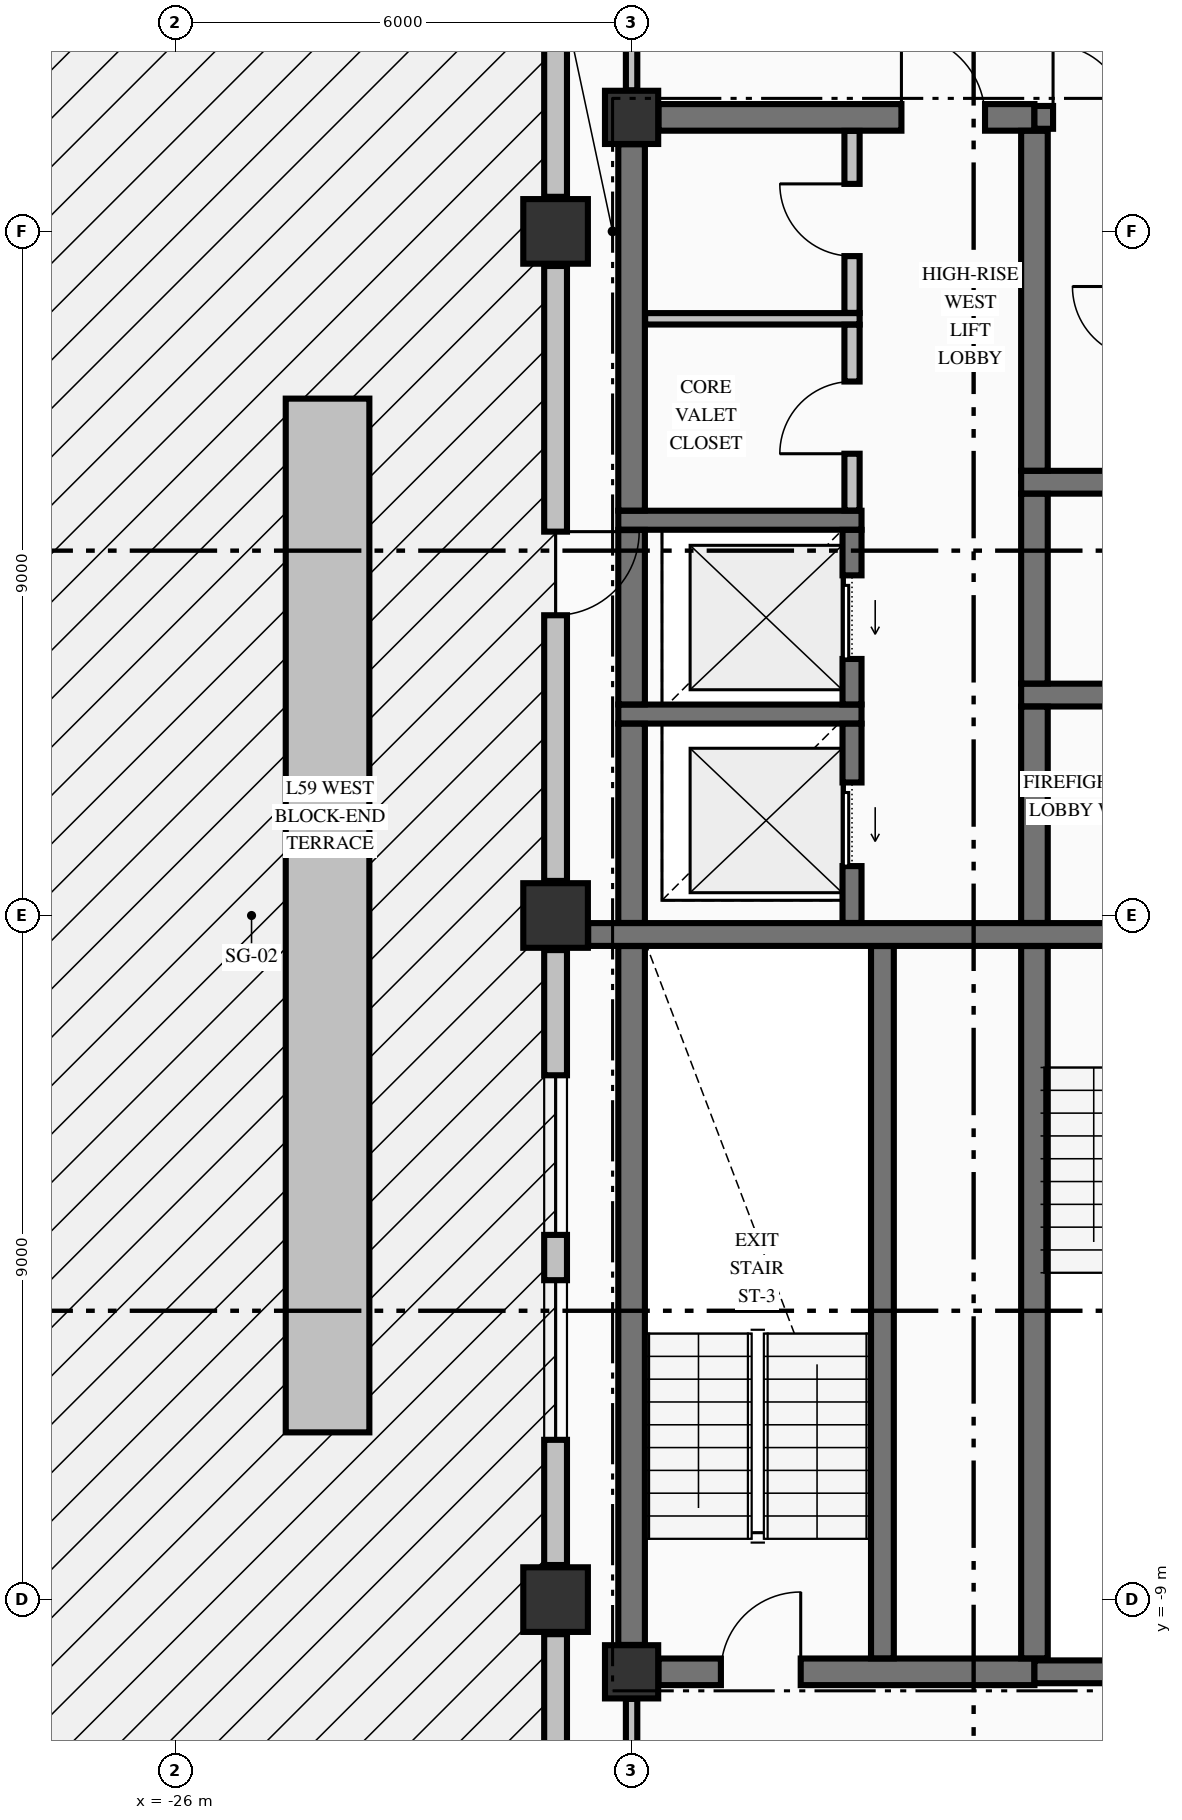
"""IFC4 building model, lengths in metres.
Left out: names, types, materials, properties, quantities, classifications, styles, units other than length and angle.
Written with IfcOpenShell. Run it as: python <this file> out.ifc"""

import sys

from ifc_helpers import new_model, si_unit, direction, frame, frame_2d, origin, origin_2d, place, context, subcontext, project, spatial, rectangle, extrude, element, fill, save


model = new_model("IFC4")
c1 = context("Model", 3, precision=1e-05, world=origin(), true_north=direction((0.0, 1.0)))
c2 = subcontext(c1, "Body", "Model", "MODEL_VIEW")
j1 = project(units=[si_unit("LENGTHUNIT", "METRE"), si_unit("PLANEANGLEUNIT", "RADIAN")], contexts=[c1])
p1 = place(None, origin())
s1 = spatial("IfcSite", under=j1, at=p1, CompositionType="ELEMENT")
p2 = place(p1, origin())
s2 = spatial("IfcBuilding", under=s1, at=p2, CompositionType="ELEMENT")
p3 = place(p2, frame((0.0, 0.0, 226.82)))
s3 = spatial("IfcBuildingStorey", under=s2, at=p3, CompositionType="ELEMENT", Elevation=226.82)
for number, where, z_axis, x_axis in (
    (1, (-21.0, -9.0, -0.425), (0.0, 0.0, 1.0), (1.0, 0.0, 0.0)),
    (2, (-21.0, 0.0, -0.425), (0.0, 0.0, 1.0), (1.0, 0.0, 0.0)),
    (3, (-21.0, 9.0, -0.425), (0.0, 0.0, 1.0), (1.0, 0.0, 0.0)),
):
    element("IfcColumn", number, at=place(p3, frame(where, z_axis=z_axis, x_axis=x_axis)), inside=s3, PredefinedType="COLUMN", context=c2, shape_type="SweptSolid", body=[
        extrude(rectangle(XDim=0.85, YDim=0.85, at=origin_2d()), origin(), (0.0, 0.0, 1.0), 3.405),
    ])
for number, where, z_axis, x_axis in (
    (4, (-20.0, -9.95, -0.425), (0.0, 0.0, 1.0), (1.0, 0.0, 0.0)),
    (5, (-20.0, 10.5, -0.425), (0.0, 0.0, 1.0), (1.0, 0.0, 0.0)),
):
    element("IfcColumn", number, at=place(p3, frame(where, z_axis=z_axis, x_axis=x_axis)), inside=s3, PredefinedType="COLUMN", context=c2, shape_type="SweptSolid", body=[
        extrude(rectangle(XDim=0.7, YDim=0.7, at=origin_2d()), origin(), (0.0, 0.0, 1.0), 3.405),
    ])
p4 = place(p3, frame((-21.0, -9.455, 0.0), z_axis=(0.0, 0.0, 1.0), x_axis=(0.0, -1.0, 0.0)))
e6 = element("IfcWall", 6, at=p4, inside=s3, PredefinedType="STANDARD", context=c2, shape_type="SweptSolid", body=[
    extrude(rectangle(XDim=8.09, YDim=0.3, at=frame_2d((4.045, 0.0))), origin(), (0.0, 0.0, 1.0), 2.372),
])
p5 = place(p3, frame((-21.0, -0.455, 0.0), z_axis=(0.0, 0.0, 1.0), x_axis=(0.0, -1.0, 0.0)))
e7 = element("IfcWall", 7, at=p5, inside=s3, PredefinedType="STANDARD", context=c2, shape_type="SweptSolid", body=[
    extrude(rectangle(XDim=8.09, YDim=0.3, at=frame_2d((4.045, 0.0))), origin(), (0.0, 0.0, 1.0), 2.372),
])
p6 = place(p5, frame((1.647, 0.0, 0.7)))
e8 = element("IfcOpeningElement", 8, at=p6, cuts=e7, PredefinedType="OPENING", context=c2, shape_type="SweptSolid", body=[
    extrude(rectangle(XDim=2.1, YDim=1.5, at=frame_2d((1.05, 0.75))), frame((0.0, 0.16, 0.0), z_axis=(0.0, -1.0, 0.0), x_axis=(1.0, 0.0, 0.0)), (0.0, 0.0, 1.0), 0.32),
])
p7 = place(p5, frame((4.343, 0.0, 0.7)))
e9 = element("IfcOpeningElement", 9, at=p7, cuts=e7, PredefinedType="OPENING", context=c2, shape_type="SweptSolid", body=[
    extrude(rectangle(XDim=2.1, YDim=1.5, at=frame_2d((1.05, 0.75))), frame((0.0, 0.16, 0.0), z_axis=(0.0, -1.0, 0.0), x_axis=(1.0, 0.0, 0.0)), (0.0, 0.0, 1.0), 0.32),
])
p8 = place(p3, frame((-21.0, 8.545, 0.0), z_axis=(0.0, 0.0, 1.0), x_axis=(0.0, -1.0, 0.0)))
e10 = element("IfcWall", 10, at=p8, inside=s3, PredefinedType="STANDARD", context=c2, shape_type="SweptSolid", body=[
    extrude(rectangle(XDim=8.09, YDim=0.3, at=frame_2d((4.045, 0.0))), origin(), (0.0, 0.0, 1.0), 2.372),
])
p9 = place(p8, frame((3.495, 0.0, 0.0)))
e11 = element("IfcOpeningElement", 11, at=p9, cuts=e10, PredefinedType="OPENING", context=c2, shape_type="SweptSolid", body=[
    extrude(rectangle(XDim=1.1, YDim=2.15, at=frame_2d((0.55, 1.075))), frame((0.0, 0.16, 0.0), z_axis=(0.0, -1.0, 0.0), x_axis=(1.0, 0.0, 0.0)), (0.0, 0.0, 1.0), 0.32),
])
p10 = place(p3, frame((-21.0, 17.545, 0.0), z_axis=(0.0, 0.0, 1.0), x_axis=(0.0, -1.0, 0.0)))
e12 = element("IfcWall", 12, at=p10, inside=s3, PredefinedType="STANDARD", context=c2, shape_type="SweptSolid", body=[
    extrude(rectangle(XDim=8.09, YDim=0.3, at=frame_2d((4.045, 0.0))), origin(), (0.0, 0.0, 1.0), 2.372),
])
p11 = place(p3, frame((-19.646, -9.95, 0.0), z_axis=(0.0, 0.0, 1.0), x_axis=(1.0, 0.0, 0.0)))
e13 = element("IfcWall", 13, at=p11, inside=s3, PredefinedType="SHEAR", context=c2, shape_type="SweptSolid", body=[
    extrude(rectangle(XDim=4.946, YDim=0.35, at=frame_2d((2.473, 0.0))), origin(), (0.0, 0.0, 1.0), 2.98),
])
p12 = place(p11, frame((0.821, 0.0, 0.0)))
e14 = element("IfcOpeningElement", 14, at=p12, cuts=e13, PredefinedType="OPENING", context=c2, shape_type="SweptSolid", body=[
    extrude(rectangle(XDim=1.05, YDim=2.15, at=frame_2d((0.525, 1.075))), frame((0.0, 0.185, 0.0), z_axis=(0.0, -1.0, 0.0), x_axis=(1.0, 0.0, 0.0)), (0.0, 0.0, 1.0), 0.37),
])
p13 = place(p3, frame((-14.7, -9.95, 0.0), z_axis=(0.0, 0.0, 1.0), x_axis=(1.0, 0.0, 0.0)))
e15 = element("IfcWall", 15, at=p13, inside=s3, PredefinedType="SHEAR", context=c2, shape_type="SweptSolid", body=[
    extrude(rectangle(XDim=3.346, YDim=0.3, at=frame_2d((1.673, 0.0))), origin(), (0.0, 0.0, 1.0), 2.98),
])
p14 = place(p3, frame((-20.571, -0.25, 0.0), z_axis=(0.0, 0.0, 1.0), x_axis=(1.0, 0.0, 0.0)))
e16 = element("IfcWall", 16, at=p14, inside=s3, PredefinedType="SHEAR", context=c2, shape_type="SweptSolid", body=[
    extrude(rectangle(XDim=9.217, YDim=0.3, at=frame_2d((4.608, 0.0))), origin(), (0.0, 0.0, 1.0), 2.98),
])
p15 = place(p14, frame((6.871, 0.0, 0.0)))
e17 = element("IfcOpeningElement", 17, at=p15, cuts=e16, PredefinedType="OPENING", context=c2, shape_type="SweptSolid", body=[
    extrude(rectangle(XDim=1.1, YDim=2.15, at=frame_2d((0.55, 1.075))), frame((0.0, 0.16, 0.0), z_axis=(0.0, -1.0, 0.0), x_axis=(1.0, 0.0, 0.0)), (0.0, 0.0, 1.0), 0.32),
])
p16 = place(p3, frame((-20.175, 2.65, 0.0), z_axis=(0.0, 0.0, 1.0), x_axis=(1.0, 0.0, 0.0)))
e18 = element("IfcWall", 18, at=p16, inside=s3, PredefinedType="SOLIDWALL", context=c2, shape_type="SweptSolid", body=[
    extrude(rectangle(XDim=3.2, YDim=0.25, at=frame_2d((1.6, 0.0))), origin(), (0.0, 0.0, 1.0), 2.98),
])
p17 = place(p3, frame((-14.875, 2.9, 0.0), z_axis=(0.0, 0.0, 1.0), x_axis=(1.0, 0.0, 0.0)))
e19 = element("IfcWall", 19, at=p17, inside=s3, PredefinedType="SHEAR", context=c2, shape_type="SweptSolid", body=[
    extrude(rectangle(XDim=4.025, YDim=0.3, at=frame_2d((2.012, 0.0))), origin(), (0.0, 0.0, 1.0), 2.98),
])
p18 = place(p17, frame((2.075, 0.0, 0.0)))
e20 = element("IfcOpeningElement", 20, at=p18, cuts=e19, PredefinedType="OPENING", context=c2, shape_type="SweptSolid", body=[
    extrude(rectangle(XDim=1.1, YDim=2.2, at=frame_2d((0.55, 1.1))), frame((0.0, 0.16, 0.0), z_axis=(0.0, -1.0, 0.0), x_axis=(1.0, 0.0, 0.0)), (0.0, 0.0, 1.0), 0.32),
])
p19 = place(p3, frame((-20.175, 5.2, 0.0), z_axis=(0.0, 0.0, 1.0), x_axis=(1.0, 0.0, 0.0)))
e21 = element("IfcWall", 21, at=p19, inside=s3, PredefinedType="SOLIDWALL", context=c2, shape_type="SweptSolid", body=[
    extrude(rectangle(XDim=3.2, YDim=0.25, at=frame_2d((1.6, 0.0))), origin(), (0.0, 0.0, 1.0), 2.98),
])
p20 = place(p3, frame((-14.875, 5.7, 0.0), z_axis=(0.0, 0.0, 1.0), x_axis=(1.0, 0.0, 0.0)))
e22 = element("IfcWall", 22, at=p20, inside=s3, PredefinedType="SHEAR", context=c2, shape_type="SweptSolid", body=[
    extrude(rectangle(XDim=4.025, YDim=0.3, at=frame_2d((2.012, 0.0))), origin(), (0.0, 0.0, 1.0), 2.98),
])
p21 = place(p3, frame((-19.646, 10.5, 0.0), z_axis=(0.0, 0.0, 1.0), x_axis=(1.0, 0.0, 0.0)))
e23 = element("IfcWall", 23, at=p21, inside=s3, PredefinedType="SHEAR", context=c2, shape_type="SweptSolid", body=[
    extrude(rectangle(XDim=4.946, YDim=0.35, at=frame_2d((2.473, 0.0))), origin(), (0.0, 0.0, 1.0), 2.98),
])
p22 = place(p21, frame((3.196, 0.0, 0.0)))
e24 = element("IfcOpeningElement", 24, at=p22, cuts=e23, PredefinedType="OPENING", context=c2, shape_type="SweptSolid", body=[
    extrude(rectangle(XDim=1.1, YDim=2.15, at=frame_2d((0.55, 1.075))), frame((0.0, 0.185, 0.0), z_axis=(0.0, -1.0, 0.0), x_axis=(1.0, 0.0, 0.0)), (0.0, 0.0, 1.0), 0.37),
])
p23 = place(p3, frame((-14.7, 10.5, 0.0), z_axis=(0.0, 0.0, 1.0), x_axis=(1.0, 0.0, 0.0)))
e25 = element("IfcWall", 25, at=p23, inside=s3, PredefinedType="SHEAR", context=c2, shape_type="SweptSolid", body=[
    extrude(rectangle(XDim=3.346, YDim=0.3, at=frame_2d((1.673, 0.0))), origin(), (0.0, 0.0, 1.0), 2.98),
])
p24 = place(p23, frame((0.245, 0.0, 0.0)))
e26 = element("IfcOpeningElement", 26, at=p24, cuts=e25, PredefinedType="OPENING", context=c2, shape_type="SweptSolid", body=[
    extrude(rectangle(XDim=0.95, YDim=2.15, at=frame_2d((0.475, 1.075))), frame((0.0, 0.16, 0.0), z_axis=(0.0, -1.0, 0.0), x_axis=(1.0, 0.0, 0.0)), (0.0, 0.0, 1.0), 0.32),
])
p25 = place(p3, frame((-19.822, 7.85, 0.0), z_axis=(0.0, 0.0, 1.0), x_axis=(1.0, 0.0, 0.0)))
e27 = element("IfcWall", 27, at=p25, inside=s3, PredefinedType="PARTITIONING", context=c2, shape_type="SweptSolid", body=[
    extrude(rectangle(XDim=2.822, YDim=0.15, at=frame_2d((1.411, 0.0))), origin(), (0.0, 0.0, 1.0), 2.98),
])
p26 = place(p3, frame((-20.0, -9.596, 0.0), z_axis=(0.0, 0.0, 1.0), x_axis=(0.0, 1.0, 0.0)))
e28 = element("IfcWall", 28, at=p26, inside=s3, PredefinedType="SHEAR", context=c2, shape_type="SweptSolid", body=[
    extrude(rectangle(XDim=9.194, YDim=0.35, at=frame_2d((4.597, 0.0))), origin(), (0.0, 0.0, 1.0), 2.98),
])
p27 = place(p3, frame((-20.0, -0.098, 0.0), z_axis=(0.0, 0.0, 1.0), x_axis=(0.0, 1.0, 0.0)))
e29 = element("IfcWall", 29, at=p27, inside=s3, PredefinedType="SHEAR", context=c2, shape_type="SweptSolid", body=[
    extrude(rectangle(XDim=2.621, YDim=0.35, at=frame_2d((1.311, 0.0))), origin(), (0.0, 0.0, 1.0), 2.98),
])
p28 = place(p3, frame((-20.0, 2.777, 0.0), z_axis=(0.0, 0.0, 1.0), x_axis=(0.0, 1.0, 0.0)))
e30 = element("IfcWall", 30, at=p28, inside=s3, PredefinedType="SHEAR", context=c2, shape_type="SweptSolid", body=[
    extrude(rectangle(XDim=2.296, YDim=0.35, at=frame_2d((1.148, 0.0))), origin(), (0.0, 0.0, 1.0), 2.98),
])
p29 = place(p3, frame((-20.0, 5.327, 0.0), z_axis=(0.0, 0.0, 1.0), x_axis=(0.0, 1.0, 0.0)))
e31 = element("IfcWall", 31, at=p29, inside=s3, PredefinedType="SHEAR", context=c2, shape_type="SweptSolid", body=[
    extrude(rectangle(XDim=4.819, YDim=0.35, at=frame_2d((2.41, 0.0))), origin(), (0.0, 0.0, 1.0), 2.98),
])
p30 = place(p3, frame((-17.1, -0.098, 0.0), z_axis=(0.0, 0.0, 1.0), x_axis=(0.0, 1.0, 0.0)))
e32 = element("IfcWall", 32, at=p30, inside=s3, PredefinedType="SOLIDWALL", context=c2, shape_type="SweptSolid", body=[
    extrude(rectangle(XDim=2.621, YDim=0.25, at=frame_2d((1.311, 0.0))), origin(), (0.0, 0.0, 1.0), 2.98),
])
p31 = place(p30, frame((0.748, 0.0, 0.0)))
e33 = element("IfcOpeningElement", 33, at=p31, cuts=e32, PredefinedType="OPENING", context=c2, shape_type="SweptSolid", body=[
    extrude(rectangle(XDim=1.1, YDim=2.2, at=frame_2d((0.55, 1.1))), frame((0.0, 0.135, 0.0), z_axis=(0.0, -1.0, 0.0), x_axis=(1.0, 0.0, 0.0)), (0.0, 0.0, 1.0), 0.27),
])
p32 = place(p3, frame((-17.1, 2.777, 0.0), z_axis=(0.0, 0.0, 1.0), x_axis=(0.0, 1.0, 0.0)))
e34 = element("IfcWall", 34, at=p32, inside=s3, PredefinedType="SOLIDWALL", context=c2, shape_type="SweptSolid", body=[
    extrude(rectangle(XDim=2.296, YDim=0.25, at=frame_2d((1.148, 0.0))), origin(), (0.0, 0.0, 1.0), 2.98),
])
p33 = place(p32, frame((0.598, 0.0, 0.0)))
e35 = element("IfcOpeningElement", 35, at=p33, cuts=e34, PredefinedType="OPENING", context=c2, shape_type="SweptSolid", body=[
    extrude(rectangle(XDim=1.1, YDim=2.2, at=frame_2d((0.55, 1.1))), frame((0.0, 0.135, 0.0), z_axis=(0.0, -1.0, 0.0), x_axis=(1.0, 0.0, 0.0)), (0.0, 0.0, 1.0), 0.27),
])
p34 = place(p3, frame((-16.7, -9.773, 0.0), z_axis=(0.0, 0.0, 1.0), x_axis=(0.0, 1.0, 0.0)))
e36 = element("IfcWall", 36, at=p34, inside=s3, PredefinedType="SHEAR", context=c2, shape_type="SweptSolid", body=[
    extrude(rectangle(XDim=9.371, YDim=0.3, at=frame_2d((4.686, 0.0))), origin(), (0.0, 0.0, 1.0), 2.98),
])
p35 = place(p3, frame((-14.7, -9.773, 0.0), z_axis=(0.0, 0.0, 1.0), x_axis=(0.0, 1.0, 0.0)))
e37 = element("IfcWall", 37, at=p35, inside=s3, PredefinedType="SHEAR", context=c2, shape_type="SweptSolid", body=[
    extrude(rectangle(XDim=9.371, YDim=0.35, at=frame_2d((4.686, 0.0))), origin(), (0.0, 0.0, 1.0), 2.98),
])
p36 = place(p3, frame((-14.7, -0.098, 0.0), z_axis=(0.0, 0.0, 1.0), x_axis=(0.0, 1.0, 0.0)))
e38 = element("IfcWall", 38, at=p36, inside=s3, PredefinedType="SHEAR", context=c2, shape_type="SweptSolid", body=[
    extrude(rectangle(XDim=2.846, YDim=0.35, at=frame_2d((1.423, 0.0))), origin(), (0.0, 0.0, 1.0), 2.98),
])
p37 = place(p3, frame((-14.7, 3.052, 0.0), z_axis=(0.0, 0.0, 1.0), x_axis=(0.0, 1.0, 0.0)))
e39 = element("IfcWall", 39, at=p37, inside=s3, PredefinedType="SHEAR", context=c2, shape_type="SweptSolid", body=[
    extrude(rectangle(XDim=2.496, YDim=0.35, at=frame_2d((1.248, 0.0))), origin(), (0.0, 0.0, 1.0), 2.98),
])
p38 = place(p3, frame((-14.7, 5.852, 0.0), z_axis=(0.0, 0.0, 1.0), x_axis=(0.0, 1.0, 0.0)))
e40 = element("IfcWall", 40, at=p38, inside=s3, PredefinedType="SHEAR", context=c2, shape_type="SweptSolid", body=[
    extrude(rectangle(XDim=4.471, YDim=0.35, at=frame_2d((2.235, 0.0))), origin(), (0.0, 0.0, 1.0), 2.98),
])
p39 = place(p3, frame((-20.0, -12.372, 0.0), z_axis=(0.0, 0.0, 1.0), x_axis=(0.0, 1.0, 0.0)))
e41 = element("IfcWall", 41, at=p39, inside=s3, PredefinedType="PARTITIONING", context=c2, shape_type="SweptSolid", body=[
    extrude(rectangle(XDim=2.066, YDim=0.15, at=frame_2d((1.033, 0.0))), origin(), (0.0, 0.0, 1.0), 2.57),
])
p40 = place(p3, frame((-20.0, 10.856, 0.0), z_axis=(0.0, 0.0, 1.0), x_axis=(0.0, 1.0, 0.0)))
e42 = element("IfcWall", 42, at=p40, inside=s3, PredefinedType="PARTITIONING", context=c2, shape_type="SweptSolid", body=[
    extrude(rectangle(XDim=2.216, YDim=0.15, at=frame_2d((1.108, 0.0))), origin(), (0.0, 0.0, 1.0), 2.57),
])
p41 = place(p3, frame((-17.1, 5.328, 0.0), z_axis=(0.0, 0.0, 1.0), x_axis=(0.0, 1.0, 0.0)))
e43 = element("IfcWall", 43, at=p41, inside=s3, PredefinedType="PARTITIONING", context=c2, shape_type="SweptSolid", body=[
    extrude(rectangle(XDim=2.444, YDim=0.2, at=frame_2d((1.222, 0.0))), origin(), (0.0, 0.0, 1.0), 2.98),
])
p42 = place(p41, frame((0.747, 0.0, 0.0)))
e44 = element("IfcOpeningElement", 44, at=p42, cuts=e43, PredefinedType="OPENING", context=c2, shape_type="SweptSolid", body=[
    extrude(rectangle(XDim=0.95, YDim=2.15, at=frame_2d((0.475, 1.075))), frame((0.0, 0.11, 0.0), z_axis=(0.0, -1.0, 0.0), x_axis=(1.0, 0.0, 0.0)), (0.0, 0.0, 1.0), 0.22),
])
p43 = place(p3, frame((-17.1, 7.928, 0.0), z_axis=(0.0, 0.0, 1.0), x_axis=(0.0, 1.0, 0.0)))
e45 = element("IfcWall", 45, at=p43, inside=s3, PredefinedType="PARTITIONING", context=c2, shape_type="SweptSolid", body=[
    extrude(rectangle(XDim=2.394, YDim=0.2, at=frame_2d((1.197, 0.0))), origin(), (0.0, 0.0, 1.0), 2.98),
])
p44 = place(p43, frame((0.747, 0.0, 0.0)))
e46 = element("IfcOpeningElement", 46, at=p44, cuts=e45, PredefinedType="OPENING", context=c2, shape_type="SweptSolid", body=[
    extrude(rectangle(XDim=0.95, YDim=2.15, at=frame_2d((0.475, 1.075))), frame((0.0, 0.11, 0.0), z_axis=(0.0, -1.0, 0.0), x_axis=(1.0, 0.0, 0.0)), (0.0, 0.0, 1.0), 0.22),
])
p45 = place(p3, frame((-24.0, -6.8, -0.04), z_axis=(0.0, 0.0, 1.0), x_axis=(0.0, 1.0, 0.0)))
e47 = element("IfcWall", 47, at=p45, inside=s3, PredefinedType="PARAPET", context=c2, shape_type="SweptSolid", body=[
    extrude(rectangle(XDim=13.6, YDim=1.1, at=frame_2d((6.8, 0.0))), origin(), (0.0, 0.0, 1.0), 0.6),
])
p46 = place(p6, origin())
e48 = element("IfcWindow", 48, at=p46, inside=s3, PartitioningType="SINGLE_PANEL", PredefinedType="WINDOW", context=c2, shape_type="SweptSolid", body=[
    extrude(rectangle(XDim=2.1, YDim=1.5, at=frame_2d((1.05, 0.75))), frame((0.0, 0.03, 0.0), z_axis=(0.0, -1.0, 0.0), x_axis=(1.0, 0.0, 0.0)), (0.0, 0.0, 1.0), 0.06),
])
fill(e8, e48)
p47 = place(p7, origin())
e49 = element("IfcWindow", 49, at=p47, inside=s3, PartitioningType="SINGLE_PANEL", PredefinedType="WINDOW", context=c2, shape_type="SweptSolid", body=[
    extrude(rectangle(XDim=2.1, YDim=1.5, at=frame_2d((1.05, 0.75))), frame((0.0, 0.03, 0.0), z_axis=(0.0, -1.0, 0.0), x_axis=(1.0, 0.0, 0.0)), (0.0, 0.0, 1.0), 0.06),
])
fill(e9, e49)
p48 = place(p9, origin())
e50 = element("IfcDoor", 50, at=p48, inside=s3, OperationType="SINGLE_SWING_LEFT", PredefinedType="DOOR", context=c2, shape_type="SweptSolid", body=[
    extrude(rectangle(XDim=1.1, YDim=2.15, at=frame_2d((0.55, 1.075))), frame((0.0, 0.025, 0.0), z_axis=(0.0, -1.0, 0.0), x_axis=(1.0, 0.0, 0.0)), (0.0, 0.0, 1.0), 0.05),
])
fill(e11, e50)
p49 = place(p24, origin())
e51 = element("IfcDoor", 51, at=p49, inside=s3, OperationType="SINGLE_SWING_LEFT", PredefinedType="DOOR", context=c2, shape_type="SweptSolid", body=[
    extrude(rectangle(XDim=0.95, YDim=2.15, at=frame_2d((0.475, 1.075))), frame((0.0, 0.025, 0.0), z_axis=(0.0, -1.0, 0.0), x_axis=(1.0, 0.0, 0.0)), (0.0, 0.0, 1.0), 0.05),
])
fill(e26, e51)
p50 = place(p12, origin())
e52 = element("IfcDoor", 52, at=p50, inside=s3, OperationType="SINGLE_SWING_RIGHT", PredefinedType="DOOR", context=c2, shape_type="SweptSolid", body=[
    extrude(rectangle(XDim=1.05, YDim=2.15, at=frame_2d((0.525, 1.075))), frame((0.0, 0.025, 0.0), z_axis=(0.0, -1.0, 0.0), x_axis=(1.0, 0.0, 0.0)), (0.0, 0.0, 1.0), 0.05),
])
fill(e14, e52)
p51 = place(p31, origin())
e53 = element("IfcDoor", 53, at=p51, inside=s3, OperationType="SLIDING_TO_LEFT", PredefinedType="DOOR", context=c2, shape_type="SweptSolid", body=[
    extrude(rectangle(XDim=1.1, YDim=2.2, at=frame_2d((0.55, 1.1))), frame((0.0, 0.025, 0.0), z_axis=(0.0, -1.0, 0.0), x_axis=(1.0, 0.0, 0.0)), (0.0, 0.0, 1.0), 0.05),
])
fill(e33, e53)
p52 = place(p33, origin())
e54 = element("IfcDoor", 54, at=p52, inside=s3, OperationType="SLIDING_TO_LEFT", PredefinedType="DOOR", context=c2, shape_type="SweptSolid", body=[
    extrude(rectangle(XDim=1.1, YDim=2.2, at=frame_2d((0.55, 1.1))), frame((0.0, 0.025, 0.0), z_axis=(0.0, -1.0, 0.0), x_axis=(1.0, 0.0, 0.0)), (0.0, 0.0, 1.0), 0.05),
])
fill(e35, e54)
p53 = place(p22, origin())
e55 = element("IfcDoor", 55, at=p53, inside=s3, OperationType="SINGLE_SWING_LEFT", PredefinedType="DOOR", context=c2, shape_type="SweptSolid", body=[
    extrude(rectangle(XDim=1.1, YDim=2.15, at=frame_2d((0.55, 1.075))), frame((0.0, 0.025, 0.0), z_axis=(0.0, -1.0, 0.0), x_axis=(1.0, 0.0, 0.0)), (0.0, 0.0, 1.0), 0.05),
])
fill(e24, e55)
p54 = place(p44, origin())
e56 = element("IfcDoor", 56, at=p54, inside=s3, OperationType="SINGLE_SWING_RIGHT", PredefinedType="DOOR", context=c2, shape_type="SweptSolid", body=[
    extrude(rectangle(XDim=0.95, YDim=2.15, at=frame_2d((0.475, 1.075))), frame((0.0, 0.025, 0.0), z_axis=(0.0, -1.0, 0.0), x_axis=(1.0, 0.0, 0.0)), (0.0, 0.0, 1.0), 0.05),
])
fill(e46, e56)
p55 = place(p42, origin())
e57 = element("IfcDoor", 57, at=p55, inside=s3, OperationType="SINGLE_SWING_LEFT", PredefinedType="DOOR", context=c2, shape_type="SweptSolid", body=[
    extrude(rectangle(XDim=0.95, YDim=2.15, at=frame_2d((0.475, 1.075))), frame((0.0, 0.025, 0.0), z_axis=(0.0, -1.0, 0.0), x_axis=(1.0, 0.0, 0.0)), (0.0, 0.0, 1.0), 0.05),
])
fill(e44, e57)
save(model, sys.argv[1])
